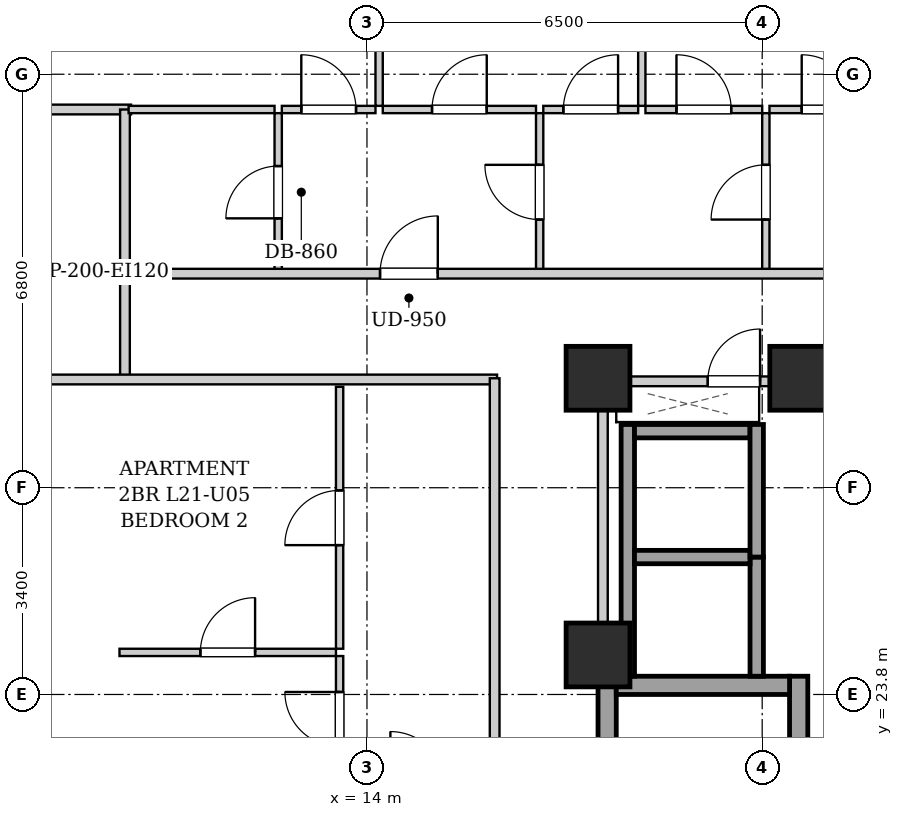
"""IFC4 building model, lengths in metres.
Left out: names, types, materials, properties, quantities, classifications, styles, units other than length and angle.
Written with IfcOpenShell. Run it as: python <this file> out.ifc"""

import sys

from ifc_helpers import new_model, si_unit, direction, frame, frame_2d, origin, origin_2d, place, context, subcontext, project, spatial, rectangle, extrude, element, fill, save


model = new_model("IFC4")
c1 = context("Model", 3, precision=1e-05, world=origin(), true_north=direction((0.0, 1.0)))
c2 = subcontext(c1, "Body", "Model", "MODEL_VIEW")
j1 = project(units=[si_unit("LENGTHUNIT", "METRE"), si_unit("PLANEANGLEUNIT", "RADIAN")], contexts=[c1])
p1 = place(None, origin())
s1 = spatial("IfcSite", under=j1, at=p1, CompositionType="ELEMENT")
p2 = place(p1, origin())
s2 = spatial("IfcBuilding", under=s1, at=p2, CompositionType="ELEMENT")
p3 = place(p2, frame((0.0, 0.0, 78.3)))
s3 = spatial("IfcBuildingStorey", under=s2, at=p3, CompositionType="ELEMENT", Elevation=78.3)
for number, where, z_axis, x_axis in (
    (1, (17.8, 29.0, 0.0), (0.0, 0.0, 1.0), (1.0, 0.0, 0.0)),
    (2, (21.15, 29.0, 0.0), (0.0, 0.0, 1.0), (1.0, 0.0, 0.0)),
    (3, (17.8, 24.45, 0.0), (0.0, 0.0, 1.0), (1.0, 0.0, 0.0)),
):
    element("IfcColumn", number, at=place(p3, frame(where, z_axis=z_axis, x_axis=x_axis)), inside=s3, PredefinedType="COLUMN", context=c2, shape_type="SweptSolid", body=[
        extrude(rectangle(XDim=1.05, YDim=1.05, at=origin_2d()), origin(), (0.0, 0.0, 1.0), 3.2),
    ])
for number, where, z_axis, x_axis in (
    (4, (17.95, 15.1, 0.0), (0.0, 0.0, 1.0), (0.0, 1.0, 0.0)),
    (5, (21.1, 15.1, 0.0), (0.0, 0.0, 1.0), (0.0, 1.0, 0.0)),
):
    element("IfcWall", number, at=place(p3, frame(where, z_axis=z_axis, x_axis=x_axis)), inside=s3, PredefinedType="SHEAR", context=c2, shape_type="SweptSolid", body=[
        extrude(rectangle(XDim=9.0, YDim=0.3, at=frame_2d((4.5, 0.0))), origin(), (0.0, 0.0, 1.0), 2.94),
    ])
p4 = place(p3, frame((18.1, 23.95, 0.0), z_axis=(0.0, 0.0, 1.0), x_axis=(1.0, 0.0, 0.0)))
e6 = element("IfcWall", 6, at=p4, inside=s3, PredefinedType="SHEAR", context=c2, shape_type="SweptSolid", body=[
    extrude(rectangle(XDim=2.85, YDim=0.3, at=frame_2d((1.425, 0.0))), origin(), (0.0, 0.0, 1.0), 2.94),
])
p5 = place(p3, frame((18.29, 24.1, 0.0), z_axis=(0.0, 0.0, 1.0), x_axis=(0.0, 1.0, 0.0)))
e7 = element("IfcWall", 7, at=p5, inside=s3, PredefinedType="SHEAR", context=c2, shape_type="SweptSolid", body=[
    extrude(rectangle(XDim=4.14, YDim=0.22, at=frame_2d((2.07, 0.0))), origin(), (0.0, 0.0, 1.0), 2.94),
])
p6 = place(p3, frame((20.41, 24.1, 0.0), z_axis=(0.0, 0.0, 1.0), x_axis=(0.0, 1.0, 0.0)))
e8 = element("IfcWall", 8, at=p6, inside=s3, PredefinedType="SHEAR", context=c2, shape_type="SweptSolid", body=[
    extrude(rectangle(XDim=1.96, YDim=0.22, at=frame_2d((0.98, 0.0))), origin(), (0.0, 0.0, 1.0), 2.94),
])
for number, where, z_axis, x_axis in (
    (9, (18.4, 26.06, 0.0), (0.0, 0.0, 1.0), (1.0, 0.0, 0.0)),
    (10, (18.4, 28.13, 0.0), (0.0, 0.0, 1.0), (1.0, 0.0, 0.0)),
):
    element("IfcWall", number, at=place(p3, frame(where, z_axis=z_axis, x_axis=x_axis)), inside=s3, PredefinedType="SHEAR", context=c2, shape_type="SweptSolid", body=[
        extrude(rectangle(XDim=1.9, YDim=0.22, at=frame_2d((0.95, 0.0))), origin(), (0.0, 0.0, 1.0), 2.94),
    ])
p7 = place(p3, frame((20.41, 26.06, 0.0), z_axis=(0.0, 0.0, 1.0), x_axis=(0.0, 1.0, 0.0)))
e11 = element("IfcWall", 11, at=p7, inside=s3, PredefinedType="SHEAR", context=c2, shape_type="SweptSolid", body=[
    extrude(rectangle(XDim=2.18, YDim=0.22, at=frame_2d((1.09, 0.0))), origin(), (0.0, 0.0, 1.0), 2.94),
])
p8 = place(p3, frame((17.88, 24.12, 0.0), z_axis=(0.0, 0.0, 1.0), x_axis=(0.0, 1.0, 0.0)))
e12 = element("IfcWall", 12, at=p8, inside=s3, PredefinedType="PARTITIONING", context=c2, shape_type="SweptSolid", body=[
    extrude(rectangle(XDim=4.76, YDim=0.16, at=frame_2d((2.38, 0.0))), origin(), (0.0, 0.0, 1.0), 2.275),
])
p9 = place(p3, frame((17.96, 28.95, 0.0), z_axis=(0.0, 0.0, 1.0), x_axis=(1.0, 0.0, 0.0)))
e13 = element("IfcWall", 13, at=p9, inside=s3, PredefinedType="PARTITIONING", context=c2, shape_type="SweptSolid", body=[
    extrude(rectangle(XDim=4.29, YDim=0.16, at=frame_2d((2.145, 0.0))), origin(), (0.0, 0.0, 1.0), 2.309),
])
p10 = place(p9, frame((1.645, 0.0, 0.0)))
e14 = element("IfcOpeningElement", 14, at=p10, cuts=e13, PredefinedType="OPENING", context=c2, shape_type="SweptSolid", body=[
    extrude(rectangle(XDim=0.86, YDim=2.05, at=frame_2d((0.43, 1.025))), frame((0.0, 0.09, 0.0), z_axis=(0.0, -1.0, 0.0), x_axis=(1.0, 0.0, 0.0)), (0.0, 0.0, 1.0), 0.18),
])
p11 = place(p3, frame((10.02, 28.98, 0.0), z_axis=(0.0, 0.0, 1.0), x_axis=(0.0, 1.0, 0.0)))
e15 = element("IfcWall", 15, at=p11, inside=s3, PredefinedType="PARTITIONING", context=c2, shape_type="SweptSolid", body=[
    extrude(rectangle(XDim=1.74, YDim=0.16, at=frame_2d((0.87, 0.0))), origin(), (0.0, 0.0, 1.0), 2.94),
])
p12 = place(p3, frame((7.78, 28.98, 0.0), z_axis=(0.0, 0.0, 1.0), x_axis=(1.0, 0.0, 0.0)))
e16 = element("IfcWall", 16, at=p12, inside=s3, PredefinedType="PARTITIONING", context=c2, shape_type="SweptSolid", body=[
    extrude(rectangle(XDim=8.36, YDim=0.16, at=frame_2d((4.18, 0.0))), origin(), (0.0, 0.0, 1.0), 2.309),
])
p13 = place(p3, frame((7.78, 33.42, 0.0), z_axis=(0.0, 0.0, 1.0), x_axis=(1.0, 0.0, 0.0)))
e17 = element("IfcWall", 17, at=p13, inside=s3, PredefinedType="PARTITIONING", context=c2, shape_type="SweptSolid", body=[
    extrude(rectangle(XDim=2.34, YDim=0.16, at=frame_2d((1.17, 0.0))), origin(), (0.0, 0.0, 1.0), 2.94),
])
p14 = place(p3, frame((10.02, 30.76, 0.0), z_axis=(0.0, 0.0, 1.0), x_axis=(0.0, 1.0, 0.0)))
e18 = element("IfcWall", 18, at=p14, inside=s3, PredefinedType="PARTITIONING", context=c2, shape_type="SweptSolid", body=[
    extrude(rectangle(XDim=2.66, YDim=0.16, at=frame_2d((1.33, 0.0))), origin(), (0.0, 0.0, 1.0), 2.94),
])
p15 = place(p3, frame((12.54, 30.76, 0.0), z_axis=(0.0, 0.0, 1.0), x_axis=(0.0, 1.0, 0.0)))
e19 = element("IfcWall", 19, at=p15, inside=s3, PredefinedType="PARTITIONING", context=c2, shape_type="SweptSolid", body=[
    extrude(rectangle(XDim=2.6, YDim=0.12, at=frame_2d((1.3, 0.0))), origin(), (0.0, 0.0, 1.0), 2.94),
])
p16 = place(p15, frame((0.87, 0.0, 0.0)))
e20 = element("IfcOpeningElement", 20, at=p16, cuts=e19, PredefinedType="OPENING", context=c2, shape_type="SweptSolid", body=[
    extrude(rectangle(XDim=0.86, YDim=2.05, at=frame_2d((0.43, 1.025))), frame((0.0, 0.07, 0.0), z_axis=(0.0, -1.0, 0.0), x_axis=(1.0, 0.0, 0.0)), (0.0, 0.0, 1.0), 0.14),
])
p17 = place(p3, frame((10.08, 33.42, 0.0), z_axis=(0.0, 0.0, 1.0), x_axis=(1.0, 0.0, 0.0)))
e21 = element("IfcWall", 21, at=p17, inside=s3, PredefinedType="PARTITIONING", context=c2, shape_type="SweptSolid", body=[
    extrude(rectangle(XDim=2.4, YDim=0.12, at=frame_2d((1.2, 0.0))), origin(), (0.0, 0.0, 1.0), 2.94),
])
p18 = place(p3, frame((16.84, 30.76, 0.0), z_axis=(0.0, 0.0, 1.0), x_axis=(0.0, 1.0, 0.0)))
e22 = element("IfcWall", 22, at=p18, inside=s3, PredefinedType="PARTITIONING", context=c2, shape_type="SweptSolid", body=[
    extrude(rectangle(XDim=2.6, YDim=0.12, at=frame_2d((1.3, 0.0))), origin(), (0.0, 0.0, 1.0), 2.94),
])
p19 = place(p18, frame((0.85, 0.0, 0.0)))
e23 = element("IfcOpeningElement", 23, at=p19, cuts=e22, PredefinedType="OPENING", context=c2, shape_type="SweptSolid", body=[
    extrude(rectangle(XDim=0.9, YDim=2.05, at=frame_2d((0.45, 1.025))), frame((0.0, 0.07, 0.0), z_axis=(0.0, -1.0, 0.0), x_axis=(1.0, 0.0, 0.0)), (0.0, 0.0, 1.0), 0.14),
])
p20 = place(p3, frame((12.6, 33.42, 0.0), z_axis=(0.0, 0.0, 1.0), x_axis=(1.0, 0.0, 0.0)))
e24 = element("IfcWall", 24, at=p20, inside=s3, PredefinedType="PARTITIONING", context=c2, shape_type="SweptSolid", body=[
    extrude(rectangle(XDim=1.54, YDim=0.12, at=frame_2d((0.77, 0.0))), origin(), (0.0, 0.0, 1.0), 2.94),
])
p21 = place(p20, frame((0.32, 0.0, 0.0)))
e25 = element("IfcOpeningElement", 25, at=p21, cuts=e24, PredefinedType="OPENING", context=c2, shape_type="SweptSolid", body=[
    extrude(rectangle(XDim=0.9, YDim=2.05, at=frame_2d((0.45, 1.025))), frame((0.0, 0.07, 0.0), z_axis=(0.0, -1.0, 0.0), x_axis=(1.0, 0.0, 0.0)), (0.0, 0.0, 1.0), 0.14),
])
p22 = place(p3, frame((14.26, 33.42, 0.0), z_axis=(0.0, 0.0, 1.0), x_axis=(1.0, 0.0, 0.0)))
e26 = element("IfcWall", 26, at=p22, inside=s3, PredefinedType="PARTITIONING", context=c2, shape_type="SweptSolid", body=[
    extrude(rectangle(XDim=2.52, YDim=0.12, at=frame_2d((1.26, 0.0))), origin(), (0.0, 0.0, 1.0), 2.94),
])
p23 = place(p22, frame((0.81, 0.0, 0.0)))
e27 = element("IfcOpeningElement", 27, at=p23, cuts=e26, PredefinedType="OPENING", context=c2, shape_type="SweptSolid", body=[
    extrude(rectangle(XDim=0.9, YDim=2.05, at=frame_2d((0.45, 1.025))), frame((0.0, 0.07, 0.0), z_axis=(0.0, -1.0, 0.0), x_axis=(1.0, 0.0, 0.0)), (0.0, 0.0, 1.0), 0.14),
])
p24 = place(p3, frame((20.56, 30.76, 0.0), z_axis=(0.0, 0.0, 1.0), x_axis=(0.0, 1.0, 0.0)))
e28 = element("IfcWall", 28, at=p24, inside=s3, PredefinedType="PARTITIONING", context=c2, shape_type="SweptSolid", body=[
    extrude(rectangle(XDim=2.6, YDim=0.12, at=frame_2d((1.3, 0.0))), origin(), (0.0, 0.0, 1.0), 2.94),
])
p25 = place(p24, frame((0.85, 0.0, 0.0)))
e29 = element("IfcOpeningElement", 29, at=p25, cuts=e28, PredefinedType="OPENING", context=c2, shape_type="SweptSolid", body=[
    extrude(rectangle(XDim=0.9, YDim=2.05, at=frame_2d((0.45, 1.025))), frame((0.0, 0.07, 0.0), z_axis=(0.0, -1.0, 0.0), x_axis=(1.0, 0.0, 0.0)), (0.0, 0.0, 1.0), 0.14),
])
p26 = place(p3, frame((16.9, 33.42, 0.0), z_axis=(0.0, 0.0, 1.0), x_axis=(1.0, 0.0, 0.0)))
e30 = element("IfcWall", 30, at=p26, inside=s3, PredefinedType="PARTITIONING", context=c2, shape_type="SweptSolid", body=[
    extrude(rectangle(XDim=1.56, YDim=0.12, at=frame_2d((0.78, 0.0))), origin(), (0.0, 0.0, 1.0), 2.94),
])
p27 = place(p26, frame((0.33, 0.0, 0.0)))
e31 = element("IfcOpeningElement", 31, at=p27, cuts=e30, PredefinedType="OPENING", context=c2, shape_type="SweptSolid", body=[
    extrude(rectangle(XDim=0.9, YDim=2.05, at=frame_2d((0.45, 1.025))), frame((0.0, 0.07, 0.0), z_axis=(0.0, -1.0, 0.0), x_axis=(1.0, 0.0, 0.0)), (0.0, 0.0, 1.0), 0.14),
])
p28 = place(p3, frame((18.58, 33.42, 0.0), z_axis=(0.0, 0.0, 1.0), x_axis=(1.0, 0.0, 0.0)))
e32 = element("IfcWall", 32, at=p28, inside=s3, PredefinedType="PARTITIONING", context=c2, shape_type="SweptSolid", body=[
    extrude(rectangle(XDim=1.92, YDim=0.12, at=frame_2d((0.96, 0.0))), origin(), (0.0, 0.0, 1.0), 2.94),
])
p29 = place(p28, frame((0.51, 0.0, 0.0)))
e33 = element("IfcOpeningElement", 33, at=p29, cuts=e32, PredefinedType="OPENING", context=c2, shape_type="SweptSolid", body=[
    extrude(rectangle(XDim=0.9, YDim=2.05, at=frame_2d((0.45, 1.025))), frame((0.0, 0.07, 0.0), z_axis=(0.0, -1.0, 0.0), x_axis=(1.0, 0.0, 0.0)), (0.0, 0.0, 1.0), 0.14),
])
p30 = place(p3, frame((20.62, 33.42, 0.0), z_axis=(0.0, 0.0, 1.0), x_axis=(1.0, 0.0, 0.0)))
e34 = element("IfcWall", 34, at=p30, inside=s3, PredefinedType="PARTITIONING", context=c2, shape_type="SweptSolid", body=[
    extrude(rectangle(XDim=1.96, YDim=0.12, at=frame_2d((0.98, 0.0))), origin(), (0.0, 0.0, 1.0), 2.94),
])
p31 = place(p30, frame((0.53, 0.0, 0.0)))
e35 = element("IfcOpeningElement", 35, at=p31, cuts=e34, PredefinedType="OPENING", context=c2, shape_type="SweptSolid", body=[
    extrude(rectangle(XDim=0.9, YDim=2.05, at=frame_2d((0.45, 1.025))), frame((0.0, 0.07, 0.0), z_axis=(0.0, -1.0, 0.0), x_axis=(1.0, 0.0, 0.0)), (0.0, 0.0, 1.0), 0.14),
])
p32 = place(p3, frame((14.2, 33.48, 0.0), z_axis=(0.0, 0.0, 1.0), x_axis=(0.0, 1.0, 0.0)))
e36 = element("IfcWall", 36, at=p32, inside=s3, PredefinedType="PARTITIONING", context=c2, shape_type="SweptSolid", body=[
    extrude(rectangle(XDim=9.54, YDim=0.12, at=frame_2d((4.77, 0.0))), origin(), (0.0, 0.0, 1.0), 2.94),
])
p33 = place(p32, frame((4.305, 0.0, 0.0)))
e37 = element("IfcOpeningElement", 37, at=p33, cuts=e36, PredefinedType="OPENING", context=c2, shape_type="SweptSolid", body=[
    extrude(rectangle(XDim=0.9, YDim=2.05, at=frame_2d((0.45, 1.025))), frame((0.0, 0.07, 0.0), z_axis=(0.0, -1.0, 0.0), x_axis=(1.0, 0.0, 0.0)), (0.0, 0.0, 1.0), 0.14),
])
p34 = place(p3, frame((18.52, 33.48, 0.0), z_axis=(0.0, 0.0, 1.0), x_axis=(0.0, 1.0, 0.0)))
e38 = element("IfcWall", 38, at=p34, inside=s3, PredefinedType="PARTITIONING", context=c2, shape_type="SweptSolid", body=[
    extrude(rectangle(XDim=9.54, YDim=0.12, at=frame_2d((4.77, 0.0))), origin(), (0.0, 0.0, 1.0), 2.94),
])
p35 = place(p34, frame((4.305, 0.0, 0.0)))
e39 = element("IfcOpeningElement", 39, at=p35, cuts=e38, PredefinedType="OPENING", context=c2, shape_type="SweptSolid", body=[
    extrude(rectangle(XDim=0.9, YDim=2.05, at=frame_2d((0.45, 1.025))), frame((0.0, 0.07, 0.0), z_axis=(0.0, -1.0, 0.0), x_axis=(1.0, 0.0, 0.0)), (0.0, 0.0, 1.0), 0.14),
])
p36 = place(p3, frame((13.55, 22.35, 0.0), z_axis=(0.0, 0.0, 1.0), x_axis=(0.0, 1.0, 0.0)))
e40 = element("IfcWall", 40, at=p36, inside=s3, PredefinedType="PARTITIONING", context=c2, shape_type="SweptSolid", body=[
    extrude(rectangle(XDim=2.082, YDim=0.12, at=frame_2d((1.041, 0.0))), origin(), (0.0, 0.0, 1.0), 2.94),
])
p37 = place(p36, frame((0.591, 0.0, 0.0)))
e41 = element("IfcOpeningElement", 41, at=p37, cuts=e40, PredefinedType="OPENING", context=c2, shape_type="SweptSolid", body=[
    extrude(rectangle(XDim=0.9, YDim=2.05, at=frame_2d((0.45, 1.025))), frame((0.0, 0.07, 0.0), z_axis=(0.0, -1.0, 0.0), x_axis=(1.0, 0.0, 0.0)), (0.0, 0.0, 1.0), 0.14),
])
p38 = place(p3, frame((13.55, 24.552, 0.0), z_axis=(0.0, 0.0, 1.0), x_axis=(0.0, 1.0, 0.0)))
e42 = element("IfcWall", 42, at=p38, inside=s3, PredefinedType="PARTITIONING", context=c2, shape_type="SweptSolid", body=[
    extrude(rectangle(XDim=4.308, YDim=0.12, at=frame_2d((2.154, 0.0))), origin(), (0.0, 0.0, 1.0), 2.94),
])
p39 = place(p38, frame((1.704, 0.0, 0.0)))
e43 = element("IfcOpeningElement", 43, at=p39, cuts=e42, PredefinedType="OPENING", context=c2, shape_type="SweptSolid", body=[
    extrude(rectangle(XDim=0.9, YDim=2.05, at=frame_2d((0.45, 1.025))), frame((0.0, 0.07, 0.0), z_axis=(0.0, -1.0, 0.0), x_axis=(1.0, 0.0, 0.0)), (0.0, 0.0, 1.0), 0.14),
])
p40 = place(p3, frame((9.93, 24.492, 0.0), z_axis=(0.0, 0.0, 1.0), x_axis=(1.0, 0.0, 0.0)))
e44 = element("IfcWall", 44, at=p40, inside=s3, PredefinedType="PARTITIONING", context=c2, shape_type="SweptSolid", body=[
    extrude(rectangle(XDim=3.56, YDim=0.12, at=frame_2d((1.78, 0.0))), origin(), (0.0, 0.0, 1.0), 2.518),
])
p41 = place(p40, frame((1.33, 0.0, 0.0)))
e45 = element("IfcOpeningElement", 45, at=p41, cuts=e44, PredefinedType="OPENING", context=c2, shape_type="SweptSolid", body=[
    extrude(rectangle(XDim=0.9, YDim=2.05, at=frame_2d((0.45, 1.025))), frame((0.0, 0.07, 0.0), z_axis=(0.0, -1.0, 0.0), x_axis=(1.0, 0.0, 0.0)), (0.0, 0.0, 1.0), 0.14),
])
p42 = place(p3, frame((10.05, 30.72, 0.0), z_axis=(0.0, 0.0, 1.0), x_axis=(1.0, 0.0, 0.0)))
e46 = element("IfcWall", 46, at=p42, inside=s3, PredefinedType="PARTITIONING", context=c2, shape_type="SweptSolid", body=[
    extrude(rectangle(XDim=30.8, YDim=0.16, at=frame_2d((15.4, 0.0))), origin(), (0.0, 0.0, 1.0), 2.94),
])
p43 = place(p42, frame((4.165, 0.0, 0.0)))
e47 = element("IfcOpeningElement", 47, at=p43, cuts=e46, PredefinedType="OPENING", context=c2, shape_type="SweptSolid", body=[
    extrude(rectangle(XDim=0.95, YDim=2.1, at=frame_2d((0.475, 1.05))), frame((0.0, 0.09, 0.0), z_axis=(0.0, -1.0, 0.0), x_axis=(1.0, 0.0, 0.0)), (0.0, 0.0, 1.0), 0.18),
])
p44 = place(p3, frame((16.1, 15.07, 0.0), z_axis=(0.0, 0.0, 1.0), x_axis=(0.0, 1.0, 0.0)))
e48 = element("IfcWall", 48, at=p44, inside=s3, PredefinedType="PARTITIONING", context=c2, shape_type="SweptSolid", body=[
    extrude(rectangle(XDim=13.93, YDim=0.16, at=frame_2d((6.965, 0.0))), origin(), (0.0, 0.0, 1.0), 2.94),
])
p45 = place(p44, frame((4.385, 0.0, 0.0)))
e49 = element("IfcOpeningElement", 49, at=p45, cuts=e48, PredefinedType="OPENING", context=c2, shape_type="SweptSolid", body=[
    extrude(rectangle(XDim=0.95, YDim=2.1, at=frame_2d((0.475, 1.05))), frame((0.0, 0.09, 0.0), z_axis=(0.0, -1.0, 0.0), x_axis=(1.0, 0.0, 0.0)), (0.0, 0.0, 1.0), 0.18),
])
p46 = place(p10, origin())
e50 = element("IfcDoor", 50, at=p46, inside=s3, OperationType="SINGLE_SWING_RIGHT", PredefinedType="DOOR", context=c2, shape_type="SweptSolid", body=[
    extrude(rectangle(XDim=0.86, YDim=2.05, at=frame_2d((0.43, 1.025))), frame((0.0, 0.025, 0.0), z_axis=(0.0, -1.0, 0.0), x_axis=(1.0, 0.0, 0.0)), (0.0, 0.0, 1.0), 0.05),
])
fill(e14, e50)
p47 = place(p16, origin())
e51 = element("IfcDoor", 51, at=p47, inside=s3, OperationType="SINGLE_SWING_LEFT", PredefinedType="DOOR", context=c2, shape_type="SweptSolid", body=[
    extrude(rectangle(XDim=0.86, YDim=2.05, at=frame_2d((0.43, 1.025))), frame((0.0, 0.025, 0.0), z_axis=(0.0, -1.0, 0.0), x_axis=(1.0, 0.0, 0.0)), (0.0, 0.0, 1.0), 0.05),
])
fill(e20, e51)
p48 = place(p19, origin())
e52 = element("IfcDoor", 52, at=p48, inside=s3, OperationType="SINGLE_SWING_RIGHT", PredefinedType="DOOR", context=c2, shape_type="SweptSolid", body=[
    extrude(rectangle(XDim=0.9, YDim=2.05, at=frame_2d((0.45, 1.025))), frame((0.0, 0.025, 0.0), z_axis=(0.0, -1.0, 0.0), x_axis=(1.0, 0.0, 0.0)), (0.0, 0.0, 1.0), 0.05),
])
fill(e23, e52)
p49 = place(p21, origin())
e53 = element("IfcDoor", 53, at=p49, inside=s3, OperationType="SINGLE_SWING_LEFT", PredefinedType="DOOR", context=c2, shape_type="SweptSolid", body=[
    extrude(rectangle(XDim=0.9, YDim=2.05, at=frame_2d((0.45, 1.025))), frame((0.0, 0.025, 0.0), z_axis=(0.0, -1.0, 0.0), x_axis=(1.0, 0.0, 0.0)), (0.0, 0.0, 1.0), 0.05),
])
fill(e25, e53)
p50 = place(p23, origin())
e54 = element("IfcDoor", 54, at=p50, inside=s3, OperationType="SINGLE_SWING_RIGHT", PredefinedType="DOOR", context=c2, shape_type="SweptSolid", body=[
    extrude(rectangle(XDim=0.9, YDim=2.05, at=frame_2d((0.45, 1.025))), frame((0.0, 0.025, 0.0), z_axis=(0.0, -1.0, 0.0), x_axis=(1.0, 0.0, 0.0)), (0.0, 0.0, 1.0), 0.05),
])
fill(e27, e54)
p51 = place(p25, origin())
e55 = element("IfcDoor", 55, at=p51, inside=s3, OperationType="SINGLE_SWING_LEFT", PredefinedType="DOOR", context=c2, shape_type="SweptSolid", body=[
    extrude(rectangle(XDim=0.9, YDim=2.05, at=frame_2d((0.45, 1.025))), frame((0.0, 0.025, 0.0), z_axis=(0.0, -1.0, 0.0), x_axis=(1.0, 0.0, 0.0)), (0.0, 0.0, 1.0), 0.05),
])
fill(e29, e55)
p52 = place(p27, origin())
e56 = element("IfcDoor", 56, at=p52, inside=s3, OperationType="SINGLE_SWING_RIGHT", PredefinedType="DOOR", context=c2, shape_type="SweptSolid", body=[
    extrude(rectangle(XDim=0.9, YDim=2.05, at=frame_2d((0.45, 1.025))), frame((0.0, 0.025, 0.0), z_axis=(0.0, -1.0, 0.0), x_axis=(1.0, 0.0, 0.0)), (0.0, 0.0, 1.0), 0.05),
])
fill(e31, e56)
p53 = place(p29, origin())
e57 = element("IfcDoor", 57, at=p53, inside=s3, OperationType="SINGLE_SWING_LEFT", PredefinedType="DOOR", context=c2, shape_type="SweptSolid", body=[
    extrude(rectangle(XDim=0.9, YDim=2.05, at=frame_2d((0.45, 1.025))), frame((0.0, 0.025, 0.0), z_axis=(0.0, -1.0, 0.0), x_axis=(1.0, 0.0, 0.0)), (0.0, 0.0, 1.0), 0.05),
])
fill(e33, e57)
p54 = place(p31, origin())
e58 = element("IfcDoor", 58, at=p54, inside=s3, OperationType="SINGLE_SWING_LEFT", PredefinedType="DOOR", context=c2, shape_type="SweptSolid", body=[
    extrude(rectangle(XDim=0.9, YDim=2.05, at=frame_2d((0.45, 1.025))), frame((0.0, 0.025, 0.0), z_axis=(0.0, -1.0, 0.0), x_axis=(1.0, 0.0, 0.0)), (0.0, 0.0, 1.0), 0.05),
])
fill(e35, e58)
p55 = place(p37, origin())
e59 = element("IfcDoor", 59, at=p55, inside=s3, OperationType="SINGLE_SWING_RIGHT", PredefinedType="DOOR", context=c2, shape_type="SweptSolid", body=[
    extrude(rectangle(XDim=0.9, YDim=2.05, at=frame_2d((0.45, 1.025))), frame((0.0, 0.025, 0.0), z_axis=(0.0, -1.0, 0.0), x_axis=(1.0, 0.0, 0.0)), (0.0, 0.0, 1.0), 0.05),
])
fill(e41, e59)
p56 = place(p39, origin())
e60 = element("IfcDoor", 60, at=p56, inside=s3, OperationType="SINGLE_SWING_LEFT", PredefinedType="DOOR", context=c2, shape_type="SweptSolid", body=[
    extrude(rectangle(XDim=0.9, YDim=2.05, at=frame_2d((0.45, 1.025))), frame((0.0, 0.025, 0.0), z_axis=(0.0, -1.0, 0.0), x_axis=(1.0, 0.0, 0.0)), (0.0, 0.0, 1.0), 0.05),
])
fill(e43, e60)
p57 = place(p41, origin())
e61 = element("IfcDoor", 61, at=p57, inside=s3, OperationType="SINGLE_SWING_RIGHT", PredefinedType="DOOR", context=c2, shape_type="SweptSolid", body=[
    extrude(rectangle(XDim=0.9, YDim=2.05, at=frame_2d((0.45, 1.025))), frame((0.0, 0.025, 0.0), z_axis=(0.0, -1.0, 0.0), x_axis=(1.0, 0.0, 0.0)), (0.0, 0.0, 1.0), 0.05),
])
fill(e45, e61)
p58 = place(p43, origin())
e62 = element("IfcDoor", 62, at=p58, inside=s3, OperationType="SINGLE_SWING_RIGHT", PredefinedType="DOOR", context=c2, shape_type="SweptSolid", body=[
    extrude(rectangle(XDim=0.95, YDim=2.1, at=frame_2d((0.475, 1.05))), frame((0.0, 0.025, 0.0), z_axis=(0.0, -1.0, 0.0), x_axis=(1.0, 0.0, 0.0)), (0.0, 0.0, 1.0), 0.05),
])
fill(e47, e62)
save(model, sys.argv[1])
